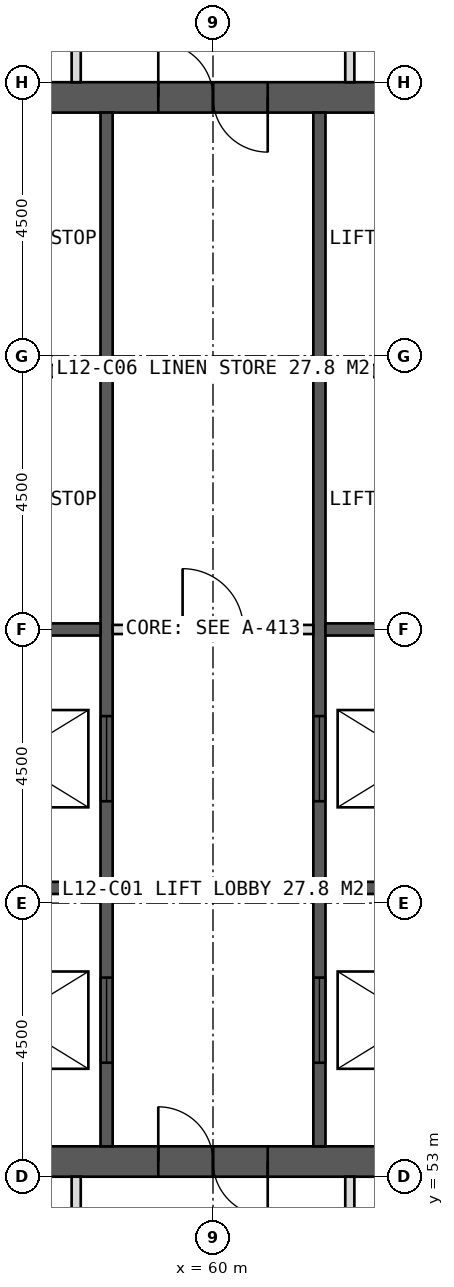
"""IFC4 building model, lengths in metres.
Left out: names, types, materials, properties, quantities, classifications, styles, units other than length and angle.
Written with IfcOpenShell. Run it as: python <this file> out.ifc"""

import sys

from ifc_helpers import new_model, si_unit, direction, frame, frame_2d, origin, place, context, subcontext, project, spatial, rectangle, extrude, element, fill, save


model = new_model("IFC4")
c1 = context("Model", 3, precision=1e-05, world=origin(), true_north=direction((0.0, 1.0)))
c2 = subcontext(c1, "Body", "Model", "MODEL_VIEW")
j1 = project(units=[si_unit("LENGTHUNIT", "METRE"), si_unit("PLANEANGLEUNIT", "RADIAN")], contexts=[c1])
p1 = place(None, origin())
s1 = spatial("IfcSite", under=j1, at=p1, CompositionType="ELEMENT")
p2 = place(p1, origin())
s2 = spatial("IfcBuilding", under=s1, at=p2, CompositionType="ELEMENT")
p3 = place(p2, frame((0.0, 0.0, 55.0)))
s3 = spatial("IfcBuildingStorey", under=s2, at=p3, CompositionType="ELEMENT", Elevation=55.0)
p4 = place(p3, frame((51.0, 70.75, 0.0), z_axis=(0.0, 0.0, 1.0), x_axis=(1.0, 0.0, 0.0)))
e1 = element("IfcWall", 1, at=p4, inside=s3, PredefinedType="SHEAR", context=c2, shape_type="SweptSolid", body=[
    extrude(rectangle(XDim=18.0, YDim=0.5, at=frame_2d((9.0, 0.0))), origin(), (0.0, 0.0, 1.0), 4.0),
])
p5 = place(p4, frame((8.1, 0.0, 0.0)))
e2 = element("IfcOpeningElement", 2, at=p5, cuts=e1, PredefinedType="OPENING", context=c2, shape_type="SweptSolid", body=[
    extrude(rectangle(XDim=1.8, YDim=2.2, at=frame_2d((0.9, 1.1))), frame((0.0, 0.26, 0.0), z_axis=(0.0, -1.0, 0.0), x_axis=(1.0, 0.0, 0.0)), (0.0, 0.0, 1.0), 0.52),
])
p6 = place(p3, frame((51.0, 53.25, 0.0), z_axis=(0.0, 0.0, 1.0), x_axis=(1.0, 0.0, 0.0)))
e3 = element("IfcWall", 3, at=p6, inside=s3, PredefinedType="SHEAR", context=c2, shape_type="SweptSolid", body=[
    extrude(rectangle(XDim=18.0, YDim=0.5, at=frame_2d((9.0, 0.0))), origin(), (0.0, 0.0, 1.0), 4.0),
])
p7 = place(p6, frame((8.1, 0.0, 0.0)))
e4 = element("IfcOpeningElement", 4, at=p7, cuts=e3, PredefinedType="OPENING", context=c2, shape_type="SweptSolid", body=[
    extrude(rectangle(XDim=1.8, YDim=2.2, at=frame_2d((0.9, 1.1))), frame((0.0, 0.26, 0.0), z_axis=(0.0, -1.0, 0.0), x_axis=(1.0, 0.0, 0.0)), (0.0, 0.0, 1.0), 0.52),
])
p8 = place(p3, frame((58.25, 53.5, 0.0), z_axis=(0.0, 0.0, 1.0), x_axis=(0.0, 1.0, 0.0)))
e5 = element("IfcWall", 5, at=p8, inside=s3, PredefinedType="SHEAR", context=c2, shape_type="SweptSolid", body=[
    extrude(rectangle(XDim=17.0, YDim=0.2, at=frame_2d((8.5, 0.0))), origin(), (0.0, 0.0, 1.0), 4.0),
])
p9 = place(p8, frame((1.375, 0.0, 0.0)))
e6 = element("IfcOpeningElement", 6, at=p9, cuts=e5, PredefinedType="OPENING", context=c2, shape_type="SweptSolid", body=[
    extrude(rectangle(XDim=1.4, YDim=2.2, at=frame_2d((0.7, 1.1))), frame((0.0, 0.11, 0.0), z_axis=(0.0, -1.0, 0.0), x_axis=(1.0, 0.0, 0.0)), (0.0, 0.0, 1.0), 0.22),
])
p10 = place(p8, frame((5.675, 0.0, 0.0)))
e7 = element("IfcOpeningElement", 7, at=p10, cuts=e5, PredefinedType="OPENING", context=c2, shape_type="SweptSolid", body=[
    extrude(rectangle(XDim=1.4, YDim=2.2, at=frame_2d((0.7, 1.1))), frame((0.0, 0.11, 0.0), z_axis=(0.0, -1.0, 0.0), x_axis=(1.0, 0.0, 0.0)), (0.0, 0.0, 1.0), 0.22),
])
p11 = place(p3, frame((61.75, 53.5, 0.0), z_axis=(0.0, 0.0, 1.0), x_axis=(0.0, 1.0, 0.0)))
e8 = element("IfcWall", 8, at=p11, inside=s3, PredefinedType="SHEAR", context=c2, shape_type="SweptSolid", body=[
    extrude(rectangle(XDim=17.0, YDim=0.2, at=frame_2d((8.5, 0.0))), origin(), (0.0, 0.0, 1.0), 4.0),
])
p12 = place(p11, frame((1.375, 0.0, 0.0)))
e9 = element("IfcOpeningElement", 9, at=p12, cuts=e8, PredefinedType="OPENING", context=c2, shape_type="SweptSolid", body=[
    extrude(rectangle(XDim=1.4, YDim=2.2, at=frame_2d((0.7, 1.1))), frame((0.0, 0.11, 0.0), z_axis=(0.0, -1.0, 0.0), x_axis=(1.0, 0.0, 0.0)), (0.0, 0.0, 1.0), 0.22),
])
p13 = place(p11, frame((5.675, 0.0, 0.0)))
e10 = element("IfcOpeningElement", 10, at=p13, cuts=e8, PredefinedType="OPENING", context=c2, shape_type="SweptSolid", body=[
    extrude(rectangle(XDim=1.4, YDim=2.2, at=frame_2d((0.7, 1.1))), frame((0.0, 0.11, 0.0), z_axis=(0.0, -1.0, 0.0), x_axis=(1.0, 0.0, 0.0)), (0.0, 0.0, 1.0), 0.22),
])
for number, where, z_axis, x_axis in (
    (11, (55.1, 57.75, 0.0), (0.0, 0.0, 1.0), (1.0, 0.0, 0.0)),
    (12, (61.85, 57.75, 0.0), (0.0, 0.0, 1.0), (1.0, 0.0, 0.0)),
    (13, (55.1, 62.0, 0.0), (0.0, 0.0, 1.0), (1.0, 0.0, 0.0)),
    (14, (61.85, 62.0, 0.0), (0.0, 0.0, 1.0), (1.0, 0.0, 0.0)),
    (15, (55.1, 66.25, 0.0), (0.0, 0.0, 1.0), (1.0, 0.0, 0.0)),
    (16, (61.85, 66.25, 0.0), (0.0, 0.0, 1.0), (1.0, 0.0, 0.0)),
):
    element("IfcWall", number, at=place(p3, frame(where, z_axis=z_axis, x_axis=x_axis)), inside=s3, PredefinedType="SHEAR", context=c2, shape_type="SweptSolid", body=[
        extrude(rectangle(XDim=3.05, YDim=0.2, at=frame_2d((1.525, 0.0))), origin(), (0.0, 0.0, 1.0), 4.0),
    ])
p14 = place(p3, frame((57.75, 71.0, 0.0), z_axis=(0.0, 0.0, 1.0), x_axis=(0.0, 1.0, 0.0)))
e17 = element("IfcWall", 17, at=p14, inside=s3, PredefinedType="PARTITIONING", context=c2, shape_type="SweptSolid", body=[
    extrude(rectangle(XDim=7.2, YDim=0.15, at=frame_2d((3.6, 0.0))), origin(), (0.0, 0.0, 1.0), 3.75),
])
p15 = place(p14, frame((0.6, 0.0, 0.0)))
e18 = element("IfcOpeningElement", 18, at=p15, cuts=e17, PredefinedType="OPENING", context=c2, shape_type="SweptSolid", body=[
    extrude(rectangle(XDim=0.9, YDim=2.1, at=frame_2d((0.45, 1.05))), frame((0.0, 0.085, 0.0), z_axis=(0.0, -1.0, 0.0), x_axis=(1.0, 0.0, 0.0)), (0.0, 0.0, 1.0), 0.17),
])
p16 = place(p3, frame((62.25, 71.0, 0.0), z_axis=(0.0, 0.0, 1.0), x_axis=(0.0, 1.0, 0.0)))
e19 = element("IfcWall", 19, at=p16, inside=s3, PredefinedType="PARTITIONING", context=c2, shape_type="SweptSolid", body=[
    extrude(rectangle(XDim=7.2, YDim=0.15, at=frame_2d((3.6, 0.0))), origin(), (0.0, 0.0, 1.0), 3.75),
])
p17 = place(p16, frame((0.6, 0.0, 0.0)))
e20 = element("IfcOpeningElement", 20, at=p17, cuts=e19, PredefinedType="OPENING", context=c2, shape_type="SweptSolid", body=[
    extrude(rectangle(XDim=0.9, YDim=2.1, at=frame_2d((0.45, 1.05))), frame((0.0, 0.085, 0.0), z_axis=(0.0, -1.0, 0.0), x_axis=(1.0, 0.0, 0.0)), (0.0, 0.0, 1.0), 0.17),
])
for number, where, z_axis, x_axis in (
    (21, (62.25, 53.0, 0.0), (0.0, 0.0, 1.0), (0.0, -1.0, 0.0)),
    (22, (57.75, 53.0, 0.0), (0.0, 0.0, 1.0), (0.0, -1.0, 0.0)),
):
    element("IfcWall", number, at=place(p3, frame(where, z_axis=z_axis, x_axis=x_axis)), inside=s3, PredefinedType="PARTITIONING", context=c2, shape_type="SweptSolid", body=[
        extrude(rectangle(XDim=7.2, YDim=0.15, at=frame_2d((3.6, 0.0))), origin(), (0.0, 0.0, 1.0), 3.75),
    ])
p18 = place(p3, frame((58.35, 62.0, 0.0), z_axis=(0.0, 0.0, 1.0), x_axis=(1.0, 0.0, 0.0)))
e23 = element("IfcWall", 23, at=p18, inside=s3, PredefinedType="PARTITIONING", context=c2, shape_type="SweptSolid", body=[
    extrude(rectangle(XDim=3.3, YDim=0.15, at=frame_2d((1.65, 0.0))), origin(), (0.0, 0.0, 1.0), 3.75),
])
p19 = place(p18, frame((1.15, 0.0, 0.0)))
e24 = element("IfcOpeningElement", 24, at=p19, cuts=e23, PredefinedType="OPENING", context=c2, shape_type="SweptSolid", body=[
    extrude(rectangle(XDim=1.0, YDim=2.1, at=frame_2d((0.5, 1.05))), frame((0.0, 0.085, 0.0), z_axis=(0.0, -1.0, 0.0), x_axis=(1.0, 0.0, 0.0)), (0.0, 0.0, 1.0), 0.17),
])
p20 = place(p7, origin())
e25 = element("IfcDoor", 25, at=p20, inside=s3, OperationType="DOUBLE_DOOR_SINGLE_SWING", PredefinedType="DOOR", context=c2, shape_type="SweptSolid", body=[
    extrude(rectangle(XDim=1.8, YDim=2.2, at=frame_2d((0.9, 1.1))), frame((0.0, 0.025, 0.0), z_axis=(0.0, -1.0, 0.0), x_axis=(1.0, 0.0, 0.0)), (0.0, 0.0, 1.0), 0.05),
])
fill(e4, e25)
p21 = place(p9, origin())
e26 = element("IfcDoor", 26, at=p21, inside=s3, OperationType="SLIDING_TO_LEFT", PredefinedType="DOOR", context=c2, shape_type="SweptSolid", body=[
    extrude(rectangle(XDim=1.4, YDim=2.2, at=frame_2d((0.7, 1.1))), frame((0.0, 0.025, 0.0), z_axis=(0.0, -1.0, 0.0), x_axis=(1.0, 0.0, 0.0)), (0.0, 0.0, 1.0), 0.05),
])
fill(e6, e26)
p22 = place(p12, origin())
e27 = element("IfcDoor", 27, at=p22, inside=s3, OperationType="SLIDING_TO_LEFT", PredefinedType="DOOR", context=c2, shape_type="SweptSolid", body=[
    extrude(rectangle(XDim=1.4, YDim=2.2, at=frame_2d((0.7, 1.1))), frame((0.0, 0.025, 0.0), z_axis=(0.0, -1.0, 0.0), x_axis=(1.0, 0.0, 0.0)), (0.0, 0.0, 1.0), 0.05),
])
fill(e9, e27)
p23 = place(p10, origin())
e28 = element("IfcDoor", 28, at=p23, inside=s3, OperationType="SLIDING_TO_LEFT", PredefinedType="DOOR", context=c2, shape_type="SweptSolid", body=[
    extrude(rectangle(XDim=1.4, YDim=2.2, at=frame_2d((0.7, 1.1))), frame((0.0, 0.025, 0.0), z_axis=(0.0, -1.0, 0.0), x_axis=(1.0, 0.0, 0.0)), (0.0, 0.0, 1.0), 0.05),
])
fill(e7, e28)
p24 = place(p13, origin())
e29 = element("IfcDoor", 29, at=p24, inside=s3, OperationType="SLIDING_TO_LEFT", PredefinedType="DOOR", context=c2, shape_type="SweptSolid", body=[
    extrude(rectangle(XDim=1.4, YDim=2.2, at=frame_2d((0.7, 1.1))), frame((0.0, 0.025, 0.0), z_axis=(0.0, -1.0, 0.0), x_axis=(1.0, 0.0, 0.0)), (0.0, 0.0, 1.0), 0.05),
])
fill(e10, e29)
p25 = place(p19, origin())
e30 = element("IfcDoor", 30, at=p25, inside=s3, OperationType="SINGLE_SWING_LEFT", PredefinedType="DOOR", context=c2, shape_type="SweptSolid", body=[
    extrude(rectangle(XDim=1.0, YDim=2.1, at=frame_2d((0.5, 1.05))), frame((0.0, 0.025, 0.0), z_axis=(0.0, -1.0, 0.0), x_axis=(1.0, 0.0, 0.0)), (0.0, 0.0, 1.0), 0.05),
])
fill(e24, e30)
p26 = place(p5, origin())
e31 = element("IfcDoor", 31, at=p26, inside=s3, OperationType="DOUBLE_DOOR_SINGLE_SWING", PredefinedType="DOOR", context=c2, shape_type="SweptSolid", body=[
    extrude(rectangle(XDim=1.8, YDim=2.2, at=frame_2d((0.9, 1.1))), frame((0.0, 0.025, 0.0), z_axis=(0.0, -1.0, 0.0), x_axis=(1.0, 0.0, 0.0)), (0.0, 0.0, 1.0), 0.05),
])
fill(e2, e31)
save(model, sys.argv[1])
